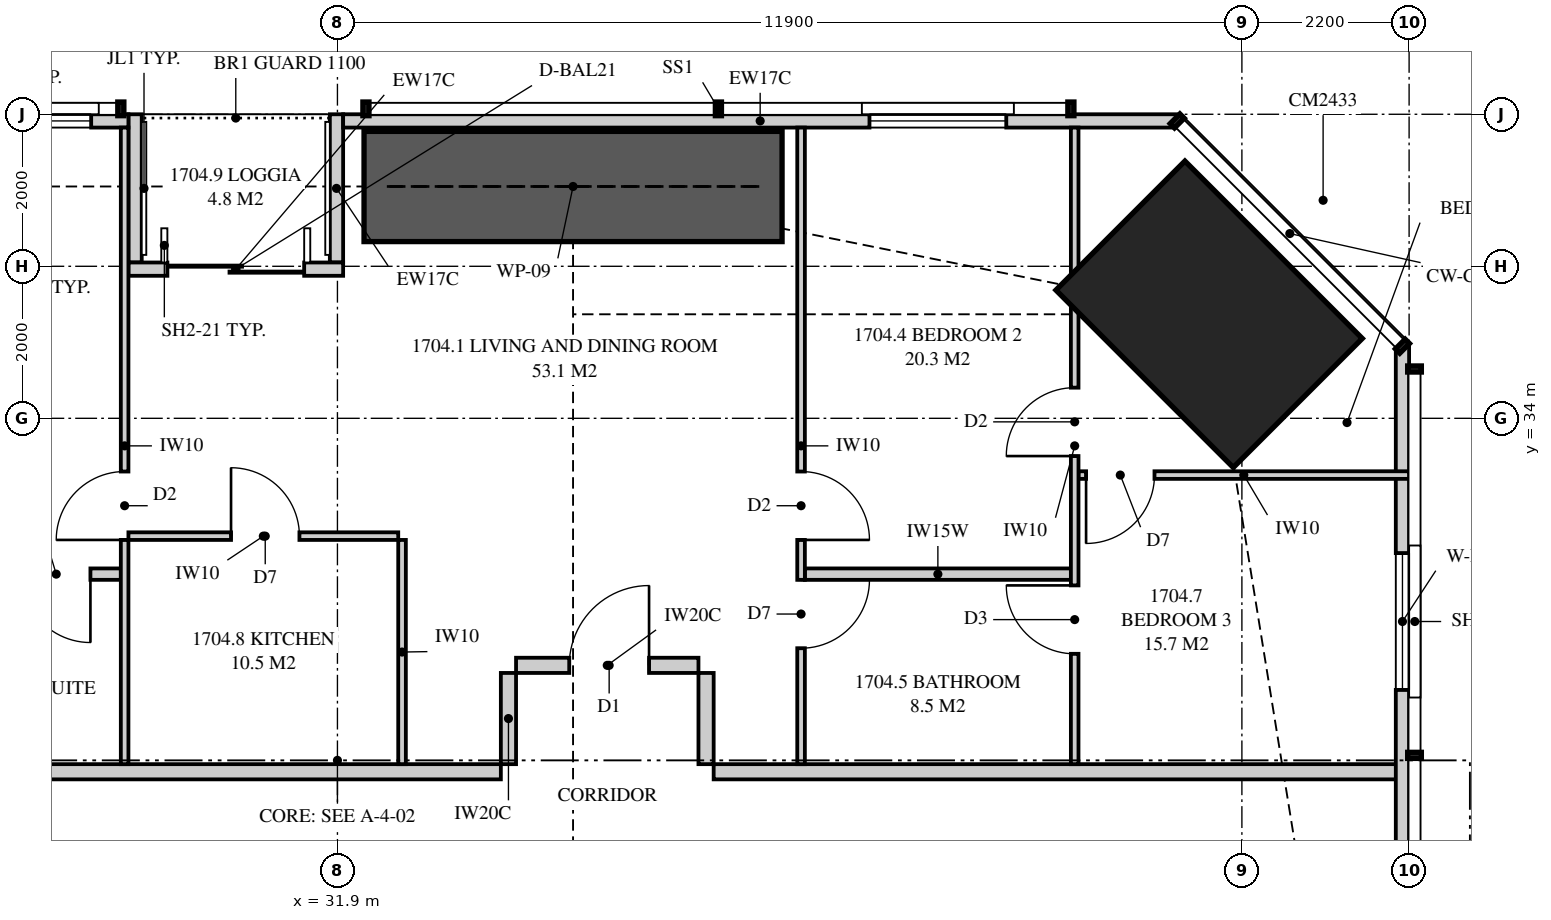
"""IFC4 building model, lengths in metres.
Left out: names, types, materials, properties, quantities, classifications, styles, units other than length and angle.
Written with IfcOpenShell. Run it as: python <this file> out.ifc"""

import sys

from ifc_helpers import new_model, si_unit, direction, frame, frame_2d, origin, origin_2d, place, context, subcontext, project, spatial, polyline, rectangle, outline, extrude, element, fill, save


model = new_model("IFC4")
c1 = context("Model", 3, precision=1e-05, world=origin(), true_north=direction((0.0, 1.0)))
c2 = subcontext(c1, "Body", "Model", "MODEL_VIEW")
j1 = project(units=[si_unit("LENGTHUNIT", "METRE"), si_unit("PLANEANGLEUNIT", "RADIAN")], contexts=[c1])
p1 = place(None, origin())
s1 = spatial("IfcSite", under=j1, at=p1, CompositionType="ELEMENT")
p2 = place(p1, origin())
s2 = spatial("IfcBuilding", under=s1, at=p2, CompositionType="ELEMENT")
p3 = place(p2, frame((0.0, 0.0, 64.55)))
s3 = spatial("IfcBuildingStorey", under=s2, at=p3, CompositionType="ELEMENT", Elevation=64.55)
p4 = place(p3, frame((43.369, 35.369, 0.0), z_axis=(0.0, 0.0, 1.0), x_axis=(-0.707106781187, -0.707106781187, 0.0)))
e1 = element("IfcColumn", 1, at=p4, inside=s3, PredefinedType="COLUMN", context=c2, shape_type="SweptSolid", body=[
    extrude(rectangle(XDim=2.4, YDim=3.3, at=origin_2d()), origin(), (0.0, 0.0, 1.0), 3.35),
])
p5 = place(p3, frame((45.913, 3.051, 0.0), z_axis=(0.0, 0.0, 1.0), x_axis=(0.0, 1.0, 0.0)))
e2 = element("IfcWall", 2, at=p5, inside=s3, PredefinedType="SOLIDWALL", context=c2, shape_type="SweptSolid", body=[
    extrude(outline(polyline([(0.0, 0.0), (31.897, 0.0), (31.897, 3.11), (22.167, 3.11), (22.167, 2.15), (22.074, 2.15), (22.074, 3.11), (21.949, 3.11), (21.949, 2.15), (9.949, 2.15), (9.949, 3.11), (9.823, 3.11), (9.823, 2.15), (9.73, 2.15), (9.73, 3.11), (0.0, 3.11), (0.0, 0.0)])), frame((0.0, 0.087, 0.0), z_axis=(0.0, -1.0, 0.0), x_axis=(1.0, 0.0, 0.0)), (0.0, 0.0, 1.0), 0.175),
])
p6 = place(p5, frame((2.222, 0.0, 0.4)))
e3 = element("IfcOpeningElement", 3, at=p6, cuts=e2, PredefinedType="OPENING", context=c2, shape_type="SweptSolid", body=[
    extrude(rectangle(XDim=1.8, YDim=1.7, at=frame_2d((0.9, 0.85))), frame((0.0, 0.097, 0.0), z_axis=(0.0, -1.0, 0.0), x_axis=(1.0, 0.0, 0.0)), (0.0, 0.0, 1.0), 0.195),
])
p7 = place(p5, frame((14.849, 0.0, 0.4)))
e4 = element("IfcOpeningElement", 4, at=p7, cuts=e2, PredefinedType="OPENING", context=c2, shape_type="SweptSolid", body=[
    extrude(rectangle(XDim=1.2, YDim=1.7, at=frame_2d((0.6, 0.85))), frame((0.0, 0.097, 0.0), z_axis=(0.0, -1.0, 0.0), x_axis=(1.0, 0.0, 0.0)), (0.0, 0.0, 1.0), 0.195),
])
p8 = place(p5, frame((27.375, 0.0, 0.4)))
e5 = element("IfcOpeningElement", 5, at=p8, cuts=e2, PredefinedType="OPENING", context=c2, shape_type="SweptSolid", body=[
    extrude(rectangle(XDim=1.8, YDim=1.7, at=frame_2d((0.9, 0.85))), frame((0.0, 0.097, 0.0), z_axis=(0.0, -1.0, 0.0), x_axis=(1.0, 0.0, 0.0)), (0.0, 0.0, 1.0), 0.195),
])
p9 = place(p3, frame((42.949, 37.913, 0.0), z_axis=(0.0, 0.0, 1.0), x_axis=(-1.0, 0.0, 0.0)))
e6 = element("IfcWall", 6, at=p9, inside=s3, PredefinedType="SOLIDWALL", context=c2, shape_type="SweptSolid", body=[
    extrude(outline(polyline([(0.0, 0.0), (10.974, 0.0), (10.974, 2.15), (7.949, 2.15), (7.949, 3.11), (7.793, 3.11), (7.793, 2.15), (7.745, 2.15), (7.745, 3.11), (0.0, 3.11), (0.0, 0.0)])), frame((0.0, 0.087, 0.0), z_axis=(0.0, -1.0, 0.0), x_axis=(1.0, 0.0, 0.0)), (0.0, 0.0, 1.0), 0.175),
])
p10 = place(p9, frame((2.249, 0.0, 0.4)))
e7 = element("IfcOpeningElement", 7, at=p10, cuts=e6, PredefinedType="OPENING", context=c2, shape_type="SweptSolid", body=[
    extrude(rectangle(XDim=1.8, YDim=1.7, at=frame_2d((0.9, 0.85))), frame((0.0, 0.097, 0.0), z_axis=(0.0, -1.0, 0.0), x_axis=(1.0, 0.0, 0.0)), (0.0, 0.0, 1.0), 0.195),
])
p11 = place(p3, frame((29.15, 37.913, 0.0), z_axis=(0.0, 0.0, 1.0), x_axis=(-1.0, 0.0, 0.0)))
e8 = element("IfcWall", 8, at=p11, inside=s3, PredefinedType="SOLIDWALL", context=c2, shape_type="SweptSolid", body=[
    extrude(rectangle(XDim=7.95, YDim=0.175, at=frame_2d((3.975, 0.0))), origin(), (0.0, 0.0, 1.0), 2.15),
])
p12 = place(p11, frame((0.49, 0.0, 0.4)))
e9 = element("IfcOpeningElement", 9, at=p12, cuts=e8, PredefinedType="OPENING", context=c2, shape_type="SweptSolid", body=[
    extrude(rectangle(XDim=1.8, YDim=1.7, at=frame_2d((0.9, 0.85))), frame((0.0, 0.097, 0.0), z_axis=(0.0, -1.0, 0.0), x_axis=(1.0, 0.0, 0.0)), (0.0, 0.0, 1.0), 0.195),
])
p13 = place(p3, frame((31.975, 35.962, 0.0), z_axis=(0.0, 0.0, 1.0), x_axis=(-1.0, 0.0, 0.0)))
e10 = element("IfcWall", 10, at=p13, inside=s3, PredefinedType="SOLIDWALL", context=c2, shape_type="SweptSolid", body=[
    extrude(rectangle(XDim=2.825, YDim=0.175, at=frame_2d((1.413, 0.0))), origin(), (0.0, 0.0, 1.0), 3.11),
])
p14 = place(p13, frame((0.512, 0.0, 0.0)))
e11 = element("IfcOpeningElement", 11, at=p14, cuts=e10, PredefinedType="OPENING", context=c2, shape_type="SweptSolid", body=[
    extrude(rectangle(XDim=1.8, YDim=2.1, at=frame_2d((0.9, 1.05))), frame((0.0, 0.097, 0.0), z_axis=(0.0, -1.0, 0.0), x_axis=(1.0, 0.0, 0.0)), (0.0, 0.0, 1.0), 0.195),
])
for number, where, z_axis, x_axis in (
    (12, (31.887, 38.0, 0.0), (0.0, 0.0, 1.0), (0.0, -1.0, 0.0)),
    (13, (29.238, 38.0, 0.0), (0.0, 0.0, 1.0), (0.0, -1.0, 0.0)),
):
    element("IfcWall", number, at=place(p3, frame(where, z_axis=z_axis, x_axis=x_axis)), inside=s3, PredefinedType="SOLIDWALL", context=c2, shape_type="SweptSolid", body=[
        extrude(outline(polyline([(0.0, 0.0), (1.95, 0.0), (1.95, 3.11), (1.75, 3.11), (1.75, 2.15), (0.15, 2.15), (0.15, 3.11), (0.0, 3.11), (0.0, 0.0)])), frame((0.0, 0.087, 0.0), z_axis=(0.0, -1.0, 0.0), x_axis=(1.0, 0.0, 0.0)), (0.0, 0.0, 1.0), 0.175),
    ])
p15 = place(p3, frame((25.0, 29.35, 0.0), z_axis=(0.0, 0.0, 1.0), x_axis=(1.0, 0.0, 0.0)))
e14 = element("IfcWall", 14, at=p15, inside=s3, PredefinedType="PARTITIONING", context=c2, shape_type="SweptSolid", body=[
    extrude(rectangle(XDim=9.05, YDim=0.2, at=frame_2d((4.525, 0.0))), origin(), (0.0, 0.0, 1.0), 3.11),
])
p16 = place(p3, frame((29.1, 37.825, 0.0), z_axis=(0.0, 0.0, 1.0), x_axis=(0.0, -1.0, 0.0)))
e15 = element("IfcWall", 15, at=p16, inside=s3, PredefinedType="PARTITIONING", context=c2, shape_type="SweptSolid", body=[
    extrude(outline(polyline([(0.0, 0.0), (8.375, 0.0), (8.375, 3.11), (1.635, 3.11), (1.635, 2.15), (0.0, 2.15), (0.0, 3.11), (0.0, 0.0)])), frame((0.0, 0.05, 0.0), z_axis=(0.0, -1.0, 0.0), x_axis=(1.0, 0.0, 0.0)), (0.0, 0.0, 1.0), 0.1),
])
p17 = place(p16, frame((4.525, 0.0, 0.0)))
e16 = element("IfcOpeningElement", 16, at=p17, cuts=e15, PredefinedType="OPENING", context=c2, shape_type="SweptSolid", body=[
    extrude(rectangle(XDim=0.9, YDim=2.1, at=frame_2d((0.45, 1.05))), frame((0.0, 0.06, 0.0), z_axis=(0.0, -1.0, 0.0), x_axis=(1.0, 0.0, 0.0)), (0.0, 0.0, 1.0), 0.12),
])
p18 = place(p3, frame((38.0, 37.825, 0.0), z_axis=(0.0, 0.0, 1.0), x_axis=(0.0, -1.0, 0.0)))
e17 = element("IfcWall", 17, at=p18, inside=s3, PredefinedType="PARTITIONING", context=c2, shape_type="SweptSolid", body=[
    extrude(outline(polyline([(0.0, 0.0), (8.375, 0.0), (8.375, 3.11), (3.716, 3.11), (3.716, 2.51), (2.255, 2.51), (2.255, 2.15), (0.5, 2.15), (0.5, 3.11), (0.0, 3.11), (0.0, 0.0)])), frame((0.0, 0.05, 0.0), z_axis=(0.0, -1.0, 0.0), x_axis=(1.0, 0.0, 0.0)), (0.0, 0.0, 1.0), 0.1),
])
p19 = place(p18, frame((4.525, 0.0, 0.0)))
e18 = element("IfcOpeningElement", 18, at=p19, cuts=e17, PredefinedType="OPENING", context=c2, shape_type="SweptSolid", body=[
    extrude(rectangle(XDim=0.9, YDim=2.1, at=frame_2d((0.45, 1.05))), frame((0.0, 0.06, 0.0), z_axis=(0.0, -1.0, 0.0), x_axis=(1.0, 0.0, 0.0)), (0.0, 0.0, 1.0), 0.12),
])
p20 = place(p18, frame((5.95, 0.0, 0.0)))
e19 = element("IfcOpeningElement", 19, at=p20, cuts=e17, PredefinedType="OPENING", context=c2, shape_type="SweptSolid", body=[
    extrude(rectangle(XDim=0.9, YDim=2.1, at=frame_2d((0.45, 1.05))), frame((0.0, 0.06, 0.0), z_axis=(0.0, -1.0, 0.0), x_axis=(1.0, 0.0, 0.0)), (0.0, 0.0, 1.0), 0.12),
])
p21 = place(p3, frame((41.6, 37.825, 0.0), z_axis=(0.0, 0.0, 1.0), x_axis=(0.0, -1.0, 0.0)))
e20 = element("IfcWall", 20, at=p21, inside=s3, PredefinedType="PARTITIONING", context=c2, shape_type="SweptSolid", body=[
    extrude(outline(polyline([(0.0, 0.0), (8.375, 0.0), (8.375, 3.11), (3.716, 3.11), (3.716, 2.51), (2.927, 2.51), (2.927, 2.15), (1.275, 2.15), (1.275, 2.51), (1.196, 2.51), (1.196, 3.11), (0.0, 3.11), (0.0, 0.0)])), frame((0.0, 0.05, 0.0), z_axis=(0.0, -1.0, 0.0), x_axis=(1.0, 0.0, 0.0)), (0.0, 0.0, 1.0), 0.1),
])
p22 = place(p21, frame((3.422, 0.0, 0.0)))
e21 = element("IfcOpeningElement", 21, at=p22, cuts=e20, PredefinedType="OPENING", context=c2, shape_type="SweptSolid", body=[
    extrude(rectangle(XDim=0.9, YDim=2.1, at=frame_2d((0.45, 1.05))), frame((0.0, 0.06, 0.0), z_axis=(0.0, -1.0, 0.0), x_axis=(1.0, 0.0, 0.0)), (0.0, 0.0, 1.0), 0.12),
])
p23 = place(p21, frame((6.023, 0.0, 0.0)))
e22 = element("IfcOpeningElement", 22, at=p23, cuts=e20, PredefinedType="OPENING", context=c2, shape_type="SweptSolid", body=[
    extrude(rectangle(XDim=0.9, YDim=2.1, at=frame_2d((0.45, 1.05))), frame((0.0, 0.06, 0.0), z_axis=(0.0, -1.0, 0.0), x_axis=(1.0, 0.0, 0.0)), (0.0, 0.0, 1.0), 0.12),
])
p24 = place(p3, frame((25.0, 31.95, 0.0), z_axis=(0.0, 0.0, 1.0), x_axis=(1.0, 0.0, 0.0)))
e23 = element("IfcWall", 23, at=p24, inside=s3, PredefinedType="PLUMBINGWALL", context=c2, shape_type="SweptSolid", body=[
    extrude(rectangle(XDim=4.05, YDim=0.15, at=frame_2d((2.025, 0.0))), origin(), (0.0, 0.0, 1.0), 3.11),
])
p25 = place(p24, frame((2.75, 0.0, 0.0)))
e24 = element("IfcOpeningElement", 24, at=p25, cuts=e23, PredefinedType="OPENING", context=c2, shape_type="SweptSolid", body=[
    extrude(rectangle(XDim=0.9, YDim=2.1, at=frame_2d((0.45, 1.05))), frame((0.0, 0.085, 0.0), z_axis=(0.0, -1.0, 0.0), x_axis=(1.0, 0.0, 0.0)), (0.0, 0.0, 1.0), 0.17),
])
p26 = place(p3, frame((38.05, 31.95, 0.0), z_axis=(0.0, 0.0, 1.0), x_axis=(1.0, 0.0, 0.0)))
e25 = element("IfcWall", 25, at=p26, inside=s3, PredefinedType="PLUMBINGWALL", context=c2, shape_type="SweptSolid", body=[
    extrude(rectangle(XDim=3.5, YDim=0.15, at=frame_2d((1.75, 0.0))), origin(), (0.0, 0.0, 1.0), 3.11),
])
p27 = place(p3, frame((41.65, 33.253, 0.0), z_axis=(0.0, 0.0, 1.0), x_axis=(1.0, 0.0, 0.0)))
e26 = element("IfcWall", 26, at=p27, inside=s3, PredefinedType="PARTITIONING", context=c2, shape_type="SweptSolid", body=[
    extrude(outline(polyline([(0.0, 0.0), (4.35, 0.0), (4.35, 3.11), (2.933, 3.11), (2.933, 2.15), (1.19, 2.15), (1.19, 3.11), (0.0, 3.11), (0.0, 0.0)])), frame((0.0, 0.05, 0.0), z_axis=(0.0, -1.0, 0.0), x_axis=(1.0, 0.0, 0.0)), (0.0, 0.0, 1.0), 0.1),
])
p28 = place(p27, frame((0.1, 0.0, 0.0)))
e27 = element("IfcOpeningElement", 27, at=p28, cuts=e26, PredefinedType="OPENING", context=c2, shape_type="SweptSolid", body=[
    extrude(rectangle(XDim=0.9, YDim=2.1, at=frame_2d((0.45, 1.05))), frame((0.0, 0.06, 0.0), z_axis=(0.0, -1.0, 0.0), x_axis=(1.0, 0.0, 0.0)), (0.0, 0.0, 1.0), 0.12),
])
p29 = place(p3, frame((29.15, 32.45, 0.0), z_axis=(0.0, 0.0, 1.0), x_axis=(1.0, 0.0, 0.0)))
e28 = element("IfcWall", 28, at=p29, inside=s3, PredefinedType="PARTITIONING", context=c2, shape_type="SweptSolid", body=[
    extrude(rectangle(XDim=3.55, YDim=0.1, at=frame_2d((1.775, 0.0))), origin(), (0.0, 0.0, 1.0), 3.11),
])
p30 = place(p29, frame((1.35, 0.0, 0.0)))
e29 = element("IfcOpeningElement", 29, at=p30, cuts=e28, PredefinedType="OPENING", context=c2, shape_type="SweptSolid", body=[
    extrude(rectangle(XDim=0.9, YDim=2.1, at=frame_2d((0.45, 1.05))), frame((0.0, 0.06, 0.0), z_axis=(0.0, -1.0, 0.0), x_axis=(1.0, 0.0, 0.0)), (0.0, 0.0, 1.0), 0.12),
])
p31 = place(p3, frame((32.75, 32.4, 0.0), z_axis=(0.0, 0.0, 1.0), x_axis=(0.0, -1.0, 0.0)))
e30 = element("IfcWall", 30, at=p31, inside=s3, PredefinedType="PARTITIONING", context=c2, shape_type="SweptSolid", body=[
    extrude(rectangle(XDim=2.95, YDim=0.1, at=frame_2d((1.475, 0.0))), origin(), (0.0, 0.0, 1.0), 3.11),
])
p32 = place(p3, frame((36.85, 29.35, 0.0), z_axis=(0.0, 0.0, 1.0), x_axis=(1.0, 0.0, 0.0)))
e31 = element("IfcWall", 31, at=p32, inside=s3, PredefinedType="PARTITIONING", context=c2, shape_type="SweptSolid", body=[
    extrude(outline(polyline([(0.0, 0.0), (9.15, 0.0), (9.15, 3.11), (8.417, 3.11), (8.417, 2.15), (6.573, 2.15), (6.573, 3.11), (0.0, 3.11), (0.0, 0.0)])), frame((0.0, 0.1, 0.0), z_axis=(0.0, -1.0, 0.0), x_axis=(1.0, 0.0, 0.0)), (0.0, 0.0, 1.0), 0.2),
])
p33 = place(p3, frame((34.25, 30.75, 0.0), z_axis=(0.0, 0.0, 1.0), x_axis=(1.0, 0.0, 0.0)))
e32 = element("IfcWall", 32, at=p33, inside=s3, PredefinedType="PARTITIONING", context=c2, shape_type="SweptSolid", body=[
    extrude(outline(polyline([(0.0, 0.0), (2.4, 0.0), (2.4, 3.11), (1.087, 3.11), (1.087, 2.541), (0.413, 2.541), (0.413, 3.11), (0.0, 3.11), (0.0, 0.0)])), frame((0.0, 0.1, 0.0), z_axis=(0.0, -1.0, 0.0), x_axis=(1.0, 0.0, 0.0)), (0.0, 0.0, 1.0), 0.2),
])
p34 = place(p33, frame((0.7, 0.0, 0.0)))
e33 = element("IfcOpeningElement", 33, at=p34, cuts=e32, PredefinedType="OPENING", context=c2, shape_type="SweptSolid", body=[
    extrude(rectangle(XDim=1.05, YDim=2.2, at=frame_2d((0.525, 1.1))), frame((0.0, 0.11, 0.0), z_axis=(0.0, -1.0, 0.0), x_axis=(1.0, 0.0, 0.0)), (0.0, 0.0, 1.0), 0.22),
])
for number, where, z_axis, x_axis in (
    (34, (34.15, 29.45, 0.0), (0.0, 0.0, 1.0), (0.0, 1.0, 0.0)),
    (35, (36.75, 29.45, 0.0), (0.0, 0.0, 1.0), (0.0, 1.0, 0.0)),
):
    element("IfcWall", number, at=place(p3, frame(where, z_axis=z_axis, x_axis=x_axis)), inside=s3, PredefinedType="PARTITIONING", context=c2, shape_type="SweptSolid", body=[
        extrude(rectangle(XDim=1.2, YDim=0.2, at=frame_2d((0.6, 0.0))), origin(), (0.0, 0.0, 1.0), 3.11),
    ])
p35 = place(p3, frame((32.25, 37.05, 0.0), z_axis=(0.0, 0.0, 1.0), x_axis=(1.0, 0.0, 0.0)))
e36 = element("IfcWall", 36, at=p35, inside=s3, PredefinedType="SHEAR", context=c2, shape_type="SweptSolid", body=[
    extrude(rectangle(XDim=5.5, YDim=1.45, at=frame_2d((2.75, 0.0))), origin(), (0.0, 0.0, 1.0), 3.35),
])
p36 = place(p8, origin())
e37 = element("IfcWindow", 37, at=p36, inside=s3, PartitioningType="SINGLE_PANEL", PredefinedType="WINDOW", context=c2, shape_type="SweptSolid", body=[
    extrude(rectangle(XDim=1.8, YDim=1.7, at=frame_2d((0.9, 0.85))), frame((0.0, 0.03, 0.0), z_axis=(0.0, -1.0, 0.0), x_axis=(1.0, 0.0, 0.0)), (0.0, 0.0, 1.0), 0.06),
])
fill(e5, e37)
p37 = place(p10, origin())
e38 = element("IfcWindow", 38, at=p37, inside=s3, PartitioningType="SINGLE_PANEL", PredefinedType="WINDOW", context=c2, shape_type="SweptSolid", body=[
    extrude(rectangle(XDim=1.8, YDim=1.7, at=frame_2d((0.9, 0.85))), frame((0.0, 0.03, 0.0), z_axis=(0.0, -1.0, 0.0), x_axis=(1.0, 0.0, 0.0)), (0.0, 0.0, 1.0), 0.06),
])
fill(e7, e38)
p38 = place(p14, origin())
e39 = element("IfcDoor", 39, at=p38, inside=s3, OperationType="SLIDING_TO_LEFT", PredefinedType="DOOR", context=c2, shape_type="SweptSolid", body=[
    extrude(rectangle(XDim=1.8, YDim=2.1, at=frame_2d((0.9, 1.05))), frame((0.0, 0.025, 0.0), z_axis=(0.0, -1.0, 0.0), x_axis=(1.0, 0.0, 0.0)), (0.0, 0.0, 1.0), 0.05),
])
fill(e11, e39)
p39 = place(p12, origin())
e40 = element("IfcWindow", 40, at=p39, inside=s3, PartitioningType="SINGLE_PANEL", PredefinedType="WINDOW", context=c2, shape_type="SweptSolid", body=[
    extrude(rectangle(XDim=1.8, YDim=1.7, at=frame_2d((0.9, 0.85))), frame((0.0, 0.03, 0.0), z_axis=(0.0, -1.0, 0.0), x_axis=(1.0, 0.0, 0.0)), (0.0, 0.0, 1.0), 0.06),
])
fill(e9, e40)
p40 = place(p34, origin())
e41 = element("IfcDoor", 41, at=p40, inside=s3, OperationType="SINGLE_SWING_RIGHT", PredefinedType="DOOR", context=c2, shape_type="SweptSolid", body=[
    extrude(rectangle(XDim=1.05, YDim=2.2, at=frame_2d((0.525, 1.1))), frame((0.0, 0.025, 0.0), z_axis=(0.0, -1.0, 0.0), x_axis=(1.0, 0.0, 0.0)), (0.0, 0.0, 1.0), 0.05),
])
fill(e33, e41)
p41 = place(p17, frame((0.9, 0.0, 0.0), z_axis=(0.0, 0.0, 1.0), x_axis=(-1.0, 0.0, 0.0)))
e42 = element("IfcDoor", 42, at=p41, inside=s3, OperationType="SINGLE_SWING_LEFT", PredefinedType="DOOR", context=c2, shape_type="SweptSolid", body=[
    extrude(rectangle(XDim=0.9, YDim=2.1, at=frame_2d((0.45, 1.05))), frame((0.0, 0.025, 0.0), z_axis=(0.0, -1.0, 0.0), x_axis=(1.0, 0.0, 0.0)), (0.0, 0.0, 1.0), 0.05),
])
fill(e16, e42)
p42 = place(p25, frame((0.9, 0.0, 0.0), z_axis=(0.0, 0.0, 1.0), x_axis=(-1.0, 0.0, 0.0)))
e43 = element("IfcDoor", 43, at=p42, inside=s3, OperationType="SINGLE_SWING_LEFT", PredefinedType="DOOR", context=c2, shape_type="SweptSolid", body=[
    extrude(rectangle(XDim=0.9, YDim=2.1, at=frame_2d((0.45, 1.05))), frame((0.0, 0.025, 0.0), z_axis=(0.0, -1.0, 0.0), x_axis=(1.0, 0.0, 0.0)), (0.0, 0.0, 1.0), 0.05),
])
fill(e24, e43)
p43 = place(p19, origin())
e44 = element("IfcDoor", 44, at=p43, inside=s3, OperationType="SINGLE_SWING_RIGHT", PredefinedType="DOOR", context=c2, shape_type="SweptSolid", body=[
    extrude(rectangle(XDim=0.9, YDim=2.1, at=frame_2d((0.45, 1.05))), frame((0.0, 0.025, 0.0), z_axis=(0.0, -1.0, 0.0), x_axis=(1.0, 0.0, 0.0)), (0.0, 0.0, 1.0), 0.05),
])
fill(e18, e44)
p44 = place(p20, origin())
e45 = element("IfcDoor", 45, at=p44, inside=s3, OperationType="SINGLE_SWING_LEFT", PredefinedType="DOOR", context=c2, shape_type="SweptSolid", body=[
    extrude(rectangle(XDim=0.9, YDim=2.1, at=frame_2d((0.45, 1.05))), frame((0.0, 0.025, 0.0), z_axis=(0.0, -1.0, 0.0), x_axis=(1.0, 0.0, 0.0)), (0.0, 0.0, 1.0), 0.05),
])
fill(e19, e45)
p45 = place(p28, frame((0.9, 0.0, 0.0), z_axis=(0.0, 0.0, 1.0), x_axis=(-1.0, 0.0, 0.0)))
e46 = element("IfcDoor", 46, at=p45, inside=s3, OperationType="SINGLE_SWING_RIGHT", PredefinedType="DOOR", context=c2, shape_type="SweptSolid", body=[
    extrude(rectangle(XDim=0.9, YDim=2.1, at=frame_2d((0.45, 1.05))), frame((0.0, 0.025, 0.0), z_axis=(0.0, -1.0, 0.0), x_axis=(1.0, 0.0, 0.0)), (0.0, 0.0, 1.0), 0.05),
])
fill(e27, e46)
p46 = place(p22, frame((0.9, 0.0, 0.0), z_axis=(0.0, 0.0, 1.0), x_axis=(-1.0, 0.0, 0.0)))
e47 = element("IfcDoor", 47, at=p46, inside=s3, OperationType="SINGLE_SWING_LEFT", PredefinedType="DOOR", context=c2, shape_type="SweptSolid", body=[
    extrude(rectangle(XDim=0.9, YDim=2.1, at=frame_2d((0.45, 1.05))), frame((0.0, 0.025, 0.0), z_axis=(0.0, -1.0, 0.0), x_axis=(1.0, 0.0, 0.0)), (0.0, 0.0, 1.0), 0.05),
])
fill(e21, e47)
p47 = place(p23, frame((0.9, 0.0, 0.0), z_axis=(0.0, 0.0, 1.0), x_axis=(-1.0, 0.0, 0.0)))
e48 = element("IfcDoor", 48, at=p47, inside=s3, OperationType="SINGLE_SWING_RIGHT", PredefinedType="DOOR", context=c2, shape_type="SweptSolid", body=[
    extrude(rectangle(XDim=0.9, YDim=2.1, at=frame_2d((0.45, 1.05))), frame((0.0, 0.025, 0.0), z_axis=(0.0, -1.0, 0.0), x_axis=(1.0, 0.0, 0.0)), (0.0, 0.0, 1.0), 0.05),
])
fill(e22, e48)
p48 = place(p30, origin())
e49 = element("IfcDoor", 49, at=p48, inside=s3, OperationType="SINGLE_SWING_LEFT", PredefinedType="DOOR", context=c2, shape_type="SweptSolid", body=[
    extrude(rectangle(XDim=0.9, YDim=2.1, at=frame_2d((0.45, 1.05))), frame((0.0, 0.025, 0.0), z_axis=(0.0, -1.0, 0.0), x_axis=(1.0, 0.0, 0.0)), (0.0, 0.0, 1.0), 0.05),
])
fill(e29, e49)
save(model, sys.argv[1])
